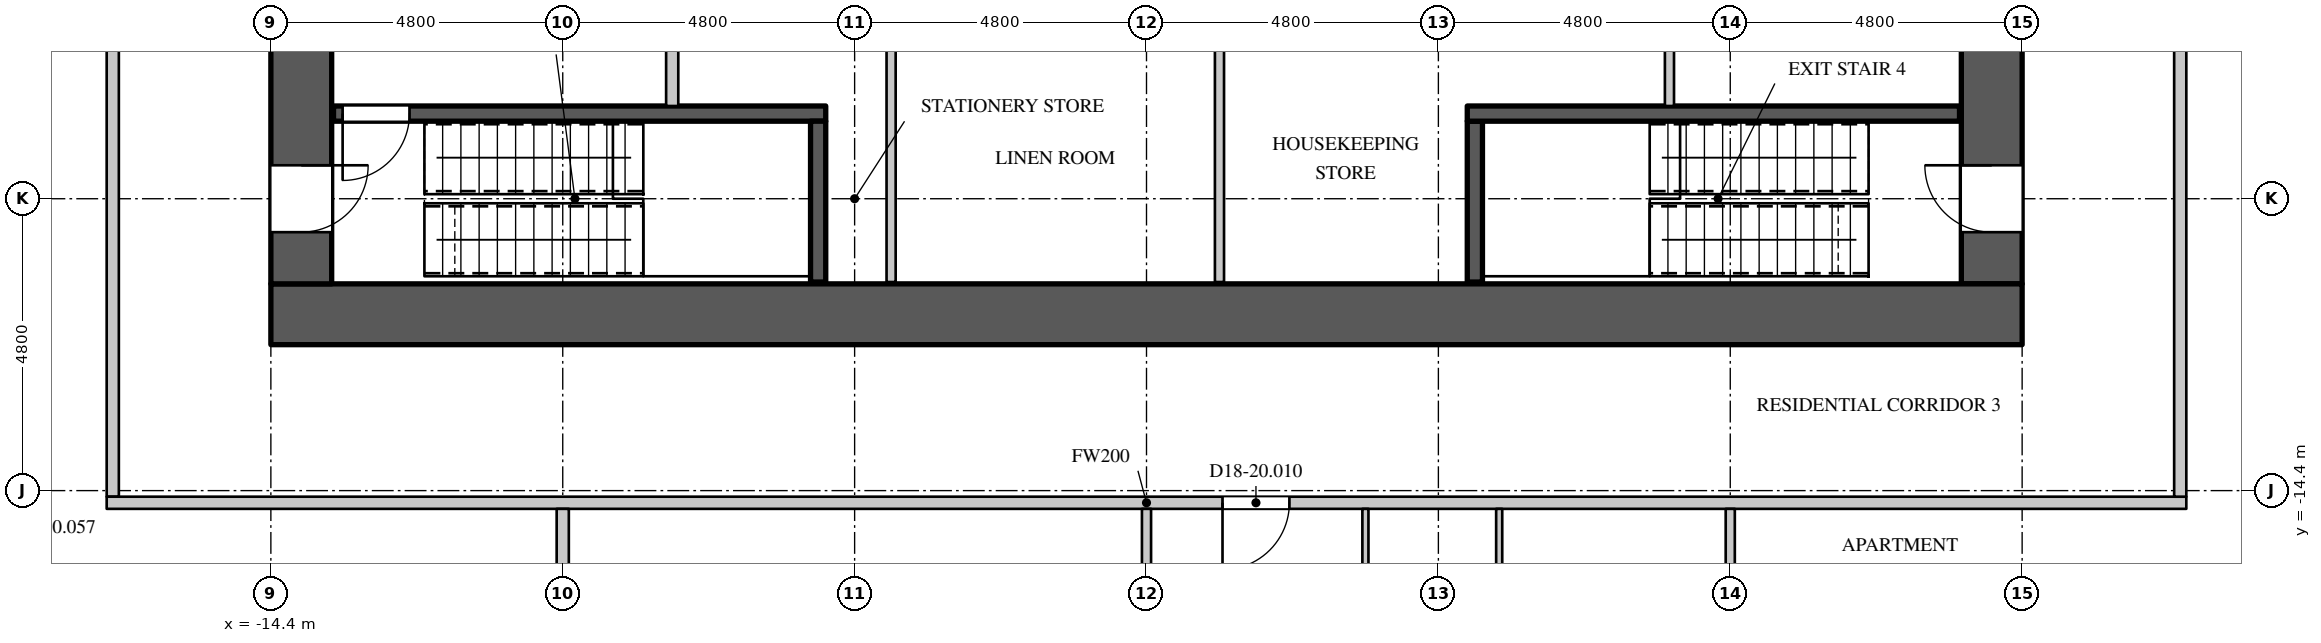
"""IFC4 building model, lengths in metres.
Left out: names, types, materials, properties, quantities, classifications, styles, units other than length and angle.
Written with IfcOpenShell. Run it as: python <this file> out.ifc"""

import sys

from ifc_helpers import new_model, si_unit, direction, frame, frame_2d, origin, place, context, subcontext, project, spatial, rectangle, extrude, element, fill, save


model = new_model("IFC4")
c1 = context("Model", 3, precision=1e-05, world=origin(), true_north=direction((0.0, 1.0)))
c2 = subcontext(c1, "Body", "Model", "MODEL_VIEW")
j1 = project(units=[si_unit("LENGTHUNIT", "METRE"), si_unit("PLANEANGLEUNIT", "RADIAN")], contexts=[c1])
p1 = place(None, origin())
s1 = spatial("IfcSite", under=j1, at=p1, CompositionType="ELEMENT")
p2 = place(p1, origin())
s2 = spatial("IfcBuilding", under=s1, at=p2, CompositionType="ELEMENT")
p3 = place(p2, frame((0.0, 0.0, 80.1)))
s3 = spatial("IfcBuildingStorey", under=s2, at=p3, CompositionType="ELEMENT", Elevation=80.1)
p4 = place(p3, frame((-14.4, -11.5, 0.0), z_axis=(0.0, 0.0, 1.0), x_axis=(1.0, 0.0, 0.0)))
e1 = element("IfcWall", 1, at=p4, inside=s3, PredefinedType="SHEAR", context=c2, shape_type="SweptSolid", body=[
    extrude(rectangle(XDim=28.8, YDim=1.0, at=frame_2d((14.4, 0.0))), origin(), (0.0, 0.0, 1.0), 4.2),
])
p5 = place(p3, frame((13.9, -11.0, 0.0), z_axis=(0.0, 0.0, 1.0), x_axis=(0.0, 1.0, 0.0)))
e2 = element("IfcWall", 2, at=p5, inside=s3, PredefinedType="SHEAR", context=c2, shape_type="SweptSolid", body=[
    extrude(rectangle(XDim=22.0, YDim=1.0, at=frame_2d((11.0, 0.0))), origin(), (0.0, 0.0, 1.0), 4.2),
])
p6 = place(p5, frame((20.05, 0.0, 0.0)))
e3 = element("IfcOpeningElement", 3, at=p6, cuts=e2, PredefinedType="OPENING", context=c2, shape_type="SweptSolid", body=[
    extrude(rectangle(XDim=1.1, YDim=2.2, at=frame_2d((0.55, 1.1))), frame((0.0, 0.51, 0.0), z_axis=(0.0, -1.0, 0.0), x_axis=(1.0, 0.0, 0.0)), (0.0, 0.0, 1.0), 1.02),
])
p7 = place(p5, frame((0.85, 0.0, 0.0)))
e4 = element("IfcOpeningElement", 4, at=p7, cuts=e2, PredefinedType="OPENING", context=c2, shape_type="SweptSolid", body=[
    extrude(rectangle(XDim=1.1, YDim=2.2, at=frame_2d((0.55, 1.1))), frame((0.0, 0.51, 0.0), z_axis=(0.0, -1.0, 0.0), x_axis=(1.0, 0.0, 0.0)), (0.0, 0.0, 1.0), 1.02),
])
p8 = place(p5, frame((14.55, 0.0, 0.0)))
e5 = element("IfcOpeningElement", 5, at=p8, cuts=e2, PredefinedType="OPENING", context=c2, shape_type="SweptSolid", body=[
    extrude(rectangle(XDim=1.5, YDim=2.4, at=frame_2d((0.75, 1.2))), frame((0.0, 0.51, 0.0), z_axis=(0.0, -1.0, 0.0), x_axis=(1.0, 0.0, 0.0)), (0.0, 0.0, 1.0), 1.02),
])
p9 = place(p5, frame((5.95, 0.0, 0.0)))
e6 = element("IfcOpeningElement", 6, at=p9, cuts=e2, PredefinedType="OPENING", context=c2, shape_type="SweptSolid", body=[
    extrude(rectangle(XDim=1.5, YDim=2.4, at=frame_2d((0.75, 1.2))), frame((0.0, 0.51, 0.0), z_axis=(0.0, -1.0, 0.0), x_axis=(1.0, 0.0, 0.0)), (0.0, 0.0, 1.0), 1.02),
])
p10 = place(p3, frame((-13.9, -11.0, 0.0), z_axis=(0.0, 0.0, 1.0), x_axis=(0.0, 1.0, 0.0)))
e7 = element("IfcWall", 7, at=p10, inside=s3, PredefinedType="SHEAR", context=c2, shape_type="SweptSolid", body=[
    extrude(rectangle(XDim=22.0, YDim=1.0, at=frame_2d((11.0, 0.0))), origin(), (0.0, 0.0, 1.0), 4.2),
])
p11 = place(p10, frame((20.05, 0.0, 0.0)))
e8 = element("IfcOpeningElement", 8, at=p11, cuts=e7, PredefinedType="OPENING", context=c2, shape_type="SweptSolid", body=[
    extrude(rectangle(XDim=1.1, YDim=2.2, at=frame_2d((0.55, 1.1))), frame((0.0, 0.51, 0.0), z_axis=(0.0, -1.0, 0.0), x_axis=(1.0, 0.0, 0.0)), (0.0, 0.0, 1.0), 1.02),
])
p12 = place(p10, frame((0.85, 0.0, 0.0)))
e9 = element("IfcOpeningElement", 9, at=p12, cuts=e7, PredefinedType="OPENING", context=c2, shape_type="SweptSolid", body=[
    extrude(rectangle(XDim=1.1, YDim=2.2, at=frame_2d((0.55, 1.1))), frame((0.0, 0.51, 0.0), z_axis=(0.0, -1.0, 0.0), x_axis=(1.0, 0.0, 0.0)), (0.0, 0.0, 1.0), 1.02),
])
p13 = place(p10, frame((15.75, 0.0, 0.0)))
e10 = element("IfcOpeningElement", 10, at=p13, cuts=e7, PredefinedType="OPENING", context=c2, shape_type="SweptSolid", body=[
    extrude(rectangle(XDim=1.5, YDim=2.4, at=frame_2d((0.75, 1.2))), frame((0.0, 0.51, 0.0), z_axis=(0.0, -1.0, 0.0), x_axis=(1.0, 0.0, 0.0)), (0.0, 0.0, 1.0), 1.02),
])
p14 = place(p10, frame((4.75, 0.0, 0.0)))
e11 = element("IfcOpeningElement", 11, at=p14, cuts=e7, PredefinedType="OPENING", context=c2, shape_type="SweptSolid", body=[
    extrude(rectangle(XDim=1.5, YDim=2.4, at=frame_2d((0.75, 1.2))), frame((0.0, 0.51, 0.0), z_axis=(0.0, -1.0, 0.0), x_axis=(1.0, 0.0, 0.0)), (0.0, 0.0, 1.0), 1.02),
])
p15 = place(p3, frame((-17.0, -14.5, 0.0), z_axis=(0.0, 0.0, 1.0), x_axis=(0.0, 1.0, 0.0)))
e12 = element("IfcWall", 12, at=p15, inside=s3, PredefinedType="PARTITIONING", context=c2, shape_type="SweptSolid", body=[
    extrude(rectangle(XDim=29.0, YDim=0.2, at=frame_2d((14.5, 0.0))), origin(), (0.0, 0.0, 1.0), 3.95),
])
p16 = place(p15, frame((16.5, 0.0, 0.0)))
e13 = element("IfcOpeningElement", 13, at=p16, cuts=e12, PredefinedType="OPENING", context=c2, shape_type="SweptSolid", body=[
    extrude(rectangle(XDim=1.1, YDim=2.4, at=frame_2d((0.55, 1.2))), frame((0.0, 0.11, 0.0), z_axis=(0.0, -1.0, 0.0), x_axis=(1.0, 0.0, 0.0)), (0.0, 0.0, 1.0), 0.22),
])
p17 = place(p3, frame((-17.1, -14.6, 0.0), z_axis=(0.0, 0.0, 1.0), x_axis=(1.0, 0.0, 0.0)))
e14 = element("IfcWall", 14, at=p17, inside=s3, PredefinedType="PARTITIONING", context=c2, shape_type="SweptSolid", body=[
    extrude(rectangle(XDim=34.2, YDim=0.2, at=frame_2d((17.1, 0.0))), origin(), (0.0, 0.0, 1.0), 3.95),
])
p18 = place(p17, frame((18.35, 0.0, 0.0)))
e15 = element("IfcOpeningElement", 15, at=p18, cuts=e14, PredefinedType="OPENING", context=c2, shape_type="SweptSolid", body=[
    extrude(rectangle(XDim=1.1, YDim=2.4, at=frame_2d((0.55, 1.2))), frame((0.0, 0.11, 0.0), z_axis=(0.0, -1.0, 0.0), x_axis=(1.0, 0.0, 0.0)), (0.0, 0.0, 1.0), 0.22),
])
p19 = place(p3, frame((-7.8, -8.075, 0.0), z_axis=(0.0, 0.0, 1.0), x_axis=(0.0, 1.0, 0.0)))
e16 = element("IfcWall", 16, at=p19, inside=s3, PredefinedType="PARTITIONING", context=c2, shape_type="SweptSolid", body=[
    extrude(rectangle(XDim=5.275, YDim=0.2, at=frame_2d((2.637, 0.0))), origin(), (0.0, 0.0, 1.0), 3.95),
])
p20 = place(p19, frame((3.0, 0.0, 0.0)))
e17 = element("IfcOpeningElement", 17, at=p20, cuts=e16, PredefinedType="OPENING", context=c2, shape_type="SweptSolid", body=[
    extrude(rectangle(XDim=1.5, YDim=2.4, at=frame_2d((0.75, 1.2))), frame((0.0, 0.11, 0.0), z_axis=(0.0, -1.0, 0.0), x_axis=(1.0, 0.0, 0.0)), (0.0, 0.0, 1.0), 0.22),
])
p21 = place(p3, frame((17.0, -14.5, 0.0), z_axis=(0.0, 0.0, 1.0), x_axis=(0.0, 1.0, 0.0)))
e18 = element("IfcWall", 18, at=p21, inside=s3, PredefinedType="PARTITIONING", context=c2, shape_type="SweptSolid", body=[
    extrude(rectangle(XDim=29.0, YDim=0.2, at=frame_2d((14.5, 0.0))), origin(), (0.0, 0.0, 1.0), 3.95),
])
p22 = place(p3, frame((-22.547, -11.885, 0.0), z_axis=(0.0, 0.0, 1.0), x_axis=(0.707106781187, -0.707106781187, 0.0)))
e19 = element("IfcWall", 19, at=p22, inside=s3, PredefinedType="PARTITIONING", context=c2, shape_type="SweptSolid", body=[
    extrude(rectangle(XDim=15.078, YDim=0.15, at=frame_2d((7.539, 0.0))), origin(), (0.0, 0.0, 1.0), 3.95),
])
p23 = place(p22, frame((3.95, 0.0, 0.0)))
e20 = element("IfcOpeningElement", 20, at=p23, cuts=e19, PredefinedType="OPENING", context=c2, shape_type="SweptSolid", body=[
    extrude(rectangle(XDim=0.95, YDim=2.2, at=frame_2d((0.475, 1.1))), frame((0.0, 0.085, 0.0), z_axis=(0.0, -1.0, 0.0), x_axis=(1.0, 0.0, 0.0)), (0.0, 0.0, 1.0), 0.17),
])
p24 = place(p22, frame((9.55, 0.0, 0.0)))
e21 = element("IfcOpeningElement", 21, at=p24, cuts=e19, PredefinedType="OPENING", context=c2, shape_type="SweptSolid", body=[
    extrude(rectangle(XDim=0.95, YDim=2.2, at=frame_2d((0.475, 1.1))), frame((0.0, 0.085, 0.0), z_axis=(0.0, -1.0, 0.0), x_axis=(1.0, 0.0, 0.0)), (0.0, 0.0, 1.0), 0.17),
])
p25 = place(p22, frame((13.95, 0.0, 0.0)))
e22 = element("IfcOpeningElement", 22, at=p25, cuts=e19, PredefinedType="OPENING", context=c2, shape_type="SweptSolid", body=[
    extrude(rectangle(XDim=0.95, YDim=2.2, at=frame_2d((0.475, 1.1))), frame((0.0, 0.085, 0.0), z_axis=(0.0, -1.0, 0.0), x_axis=(1.0, 0.0, 0.0)), (0.0, 0.0, 1.0), 0.17),
])
p26 = place(p3, frame((-4.2, -10.97, 0.0), z_axis=(0.0, 0.0, 1.0), x_axis=(0.0, 1.0, 0.0)))
e23 = element("IfcWall", 23, at=p26, inside=s3, PredefinedType="PARTITIONING", context=c2, shape_type="SweptSolid", body=[
    extrude(rectangle(XDim=5.07, YDim=0.15, at=frame_2d((2.535, 0.0))), origin(), (0.0, 0.0, 1.0), 3.95),
])
p27 = place(p3, frame((0.0, -28.855, 0.0), z_axis=(0.0, 0.0, 1.0), x_axis=(0.0, 1.0, 0.0)))
e24 = element("IfcWall", 24, at=p27, inside=s3, PredefinedType="PARTITIONING", context=c2, shape_type="SweptSolid", body=[
    extrude(rectangle(XDim=14.155, YDim=0.15, at=frame_2d((7.078, 0.0))), origin(), (0.0, 0.0, 1.0), 3.95),
])
p28 = place(p27, frame((10.2, 0.0, 0.0)))
e25 = element("IfcOpeningElement", 25, at=p28, cuts=e24, PredefinedType="OPENING", context=c2, shape_type="SweptSolid", body=[
    extrude(rectangle(XDim=0.95, YDim=2.2, at=frame_2d((0.475, 1.1))), frame((0.0, 0.085, 0.0), z_axis=(0.0, -1.0, 0.0), x_axis=(1.0, 0.0, 0.0)), (0.0, 0.0, 1.0), 0.17),
])
p29 = place(p3, frame((1.2, -10.97, 0.0), z_axis=(0.0, 0.0, 1.0), x_axis=(0.0, 1.0, 0.0)))
e26 = element("IfcWall", 26, at=p29, inside=s3, PredefinedType="PARTITIONING", context=c2, shape_type="SweptSolid", body=[
    extrude(rectangle(XDim=5.07, YDim=0.15, at=frame_2d((2.535, 0.0))), origin(), (0.0, 0.0, 1.0), 3.95),
])
p30 = place(p3, frame((8.6, -8.075, 0.0), z_axis=(0.0, 0.0, 1.0), x_axis=(0.0, 1.0, 0.0)))
e27 = element("IfcWall", 27, at=p30, inside=s3, PredefinedType="PARTITIONING", context=c2, shape_type="SweptSolid", body=[
    extrude(rectangle(XDim=2.175, YDim=0.15, at=frame_2d((1.087, 0.0))), origin(), (0.0, 0.0, 1.0), 3.95),
])
p31 = place(p3, frame((9.6, -28.855, 0.0), z_axis=(0.0, 0.0, 1.0), x_axis=(0.0, 1.0, 0.0)))
e28 = element("IfcWall", 28, at=p31, inside=s3, PredefinedType="PARTITIONING", context=c2, shape_type="SweptSolid", body=[
    extrude(rectangle(XDim=14.155, YDim=0.15, at=frame_2d((7.078, 0.0))), origin(), (0.0, 0.0, 1.0), 3.95),
])
p32 = place(p31, frame((2.1, 0.0, 0.0)))
e29 = element("IfcOpeningElement", 29, at=p32, cuts=e28, PredefinedType="OPENING", context=c2, shape_type="SweptSolid", body=[
    extrude(rectangle(XDim=1.5, YDim=2.2, at=frame_2d((0.75, 1.1))), frame((0.0, 0.085, 0.0), z_axis=(0.0, -1.0, 0.0), x_axis=(1.0, 0.0, 0.0)), (0.0, 0.0, 1.0), 0.17),
])
p33 = place(p31, frame((10.2, 0.0, 0.0)))
e30 = element("IfcOpeningElement", 30, at=p33, cuts=e28, PredefinedType="OPENING", context=c2, shape_type="SweptSolid", body=[
    extrude(rectangle(XDim=0.95, YDim=2.2, at=frame_2d((0.475, 1.1))), frame((0.0, 0.085, 0.0), z_axis=(0.0, -1.0, 0.0), x_axis=(1.0, 0.0, 0.0)), (0.0, 0.0, 1.0), 0.17),
])
p34 = place(p3, frame((16.02, -19.26, 0.0), z_axis=(0.0, 0.0, 1.0), x_axis=(0.707106781187, 0.707106781187, 0.0)))
e31 = element("IfcWall", 31, at=p34, inside=s3, PredefinedType="PARTITIONING", context=c2, shape_type="SweptSolid", body=[
    extrude(rectangle(XDim=10.229, YDim=0.15, at=frame_2d((5.114, 0.0))), origin(), (0.0, 0.0, 1.0), 3.95),
])
p35 = place(p34, frame((4.3, 0.0, 0.0)))
e32 = element("IfcOpeningElement", 32, at=p35, cuts=e31, PredefinedType="OPENING", context=c2, shape_type="SweptSolid", body=[
    extrude(rectangle(XDim=0.95, YDim=2.2, at=frame_2d((0.475, 1.1))), frame((0.0, 0.085, 0.0), z_axis=(0.0, -1.0, 0.0), x_axis=(1.0, 0.0, 0.0)), (0.0, 0.0, 1.0), 0.17),
])
p36 = place(p34, frame((0.6, 0.0, 0.0)))
e33 = element("IfcOpeningElement", 33, at=p36, cuts=e31, PredefinedType="OPENING", context=c2, shape_type="SweptSolid", body=[
    extrude(rectangle(XDim=0.95, YDim=2.2, at=frame_2d((0.475, 1.1))), frame((0.0, 0.085, 0.0), z_axis=(0.0, -1.0, 0.0), x_axis=(1.0, 0.0, 0.0)), (0.0, 0.0, 1.0), 0.17),
])
p37 = place(p34, frame((9.1, 0.0, 0.0)))
e34 = element("IfcOpeningElement", 34, at=p37, cuts=e31, PredefinedType="OPENING", context=c2, shape_type="SweptSolid", body=[
    extrude(rectangle(XDim=0.95, YDim=2.2, at=frame_2d((0.475, 1.1))), frame((0.0, 0.085, 0.0), z_axis=(0.0, -1.0, 0.0), x_axis=(1.0, 0.0, 0.0)), (0.0, 0.0, 1.0), 0.17),
])
p38 = place(p3, frame((-9.6, -28.855, 0.0), z_axis=(0.0, 0.0, 1.0), x_axis=(0.0, 1.0, 0.0)))
e35 = element("IfcWall", 35, at=p38, inside=s3, PredefinedType="PARTITIONING", context=c2, shape_type="SweptSolid", body=[
    extrude(rectangle(XDim=14.155, YDim=0.2, at=frame_2d((7.078, 0.0))), origin(), (0.0, 0.0, 1.0), 3.95),
])
p39 = place(p3, frame((-13.37, -8.2, 0.0), z_axis=(0.0, 0.0, 1.0), x_axis=(1.0, 0.0, 0.0)))
e36 = element("IfcWall", 36, at=p39, inside=s3, PredefinedType="SHEAR", context=c2, shape_type="SweptSolid", body=[
    extrude(rectangle(XDim=8.095, YDim=0.25, at=frame_2d((4.048, 0.0))), origin(), (0.0, 0.0, 1.0), 3.95),
])
p40 = place(p39, frame((0.15, 0.0, 0.0)))
e37 = element("IfcOpeningElement", 37, at=p40, cuts=e36, PredefinedType="OPENING", context=c2, shape_type="SweptSolid", body=[
    extrude(rectangle(XDim=1.1, YDim=2.2, at=frame_2d((0.55, 1.1))), frame((0.0, 0.135, 0.0), z_axis=(0.0, -1.0, 0.0), x_axis=(1.0, 0.0, 0.0)), (0.0, 0.0, 1.0), 0.27),
])
for number, where, z_axis, x_axis in (
    (38, (-5.4, -10.97, 0.0), (0.0, 0.0, 1.0), (0.0, 1.0, 0.0)),
    (39, (5.4, -10.97, 0.0), (0.0, 0.0, 1.0), (0.0, 1.0, 0.0)),
):
    element("IfcWall", number, at=place(p3, frame(where, z_axis=z_axis, x_axis=x_axis)), inside=s3, PredefinedType="SHEAR", context=c2, shape_type="SweptSolid", body=[
        extrude(rectangle(XDim=2.645, YDim=0.25, at=frame_2d((1.323, 0.0))), origin(), (0.0, 0.0, 1.0), 3.95),
    ])
p41 = place(p3, frame((5.275, -8.2, 0.0), z_axis=(0.0, 0.0, 1.0), x_axis=(1.0, 0.0, 0.0)))
e40 = element("IfcWall", 40, at=p41, inside=s3, PredefinedType="SHEAR", context=c2, shape_type="SweptSolid", body=[
    extrude(rectangle(XDim=8.095, YDim=0.25, at=frame_2d((4.048, 0.0))), origin(), (0.0, 0.0, 1.0), 3.95),
])
p42 = place(p3, frame((3.6, -21.725, 0.0), z_axis=(0.0, 0.0, 1.0), x_axis=(0.0, 1.0, 0.0)))
e41 = element("IfcWall", 41, at=p42, inside=s3, PredefinedType="PARTITIONING", context=c2, shape_type="SweptSolid", body=[
    extrude(rectangle(XDim=7.025, YDim=0.1, at=frame_2d((3.513, 0.0))), origin(), (0.0, 0.0, 1.0), 3.95),
])
p43 = place(p42, frame((3.05, 0.0, 0.0)))
e42 = element("IfcOpeningElement", 42, at=p43, cuts=e41, PredefinedType="OPENING", context=c2, shape_type="SweptSolid", body=[
    extrude(rectangle(XDim=0.9, YDim=2.2, at=frame_2d((0.45, 1.1))), frame((0.0, 0.06, 0.0), z_axis=(0.0, -1.0, 0.0), x_axis=(1.0, 0.0, 0.0)), (0.0, 0.0, 1.0), 0.12),
])
p44 = place(p3, frame((5.8, -21.725, 0.0), z_axis=(0.0, 0.0, 1.0), x_axis=(0.0, 1.0, 0.0)))
e43 = element("IfcWall", 43, at=p44, inside=s3, PredefinedType="PARTITIONING", context=c2, shape_type="SweptSolid", body=[
    extrude(rectangle(XDim=7.025, YDim=0.1, at=frame_2d((3.513, 0.0))), origin(), (0.0, 0.0, 1.0), 3.95),
])
p45 = place(p40, origin())
e44 = element("IfcDoor", 44, at=p45, inside=s3, OperationType="SINGLE_SWING_RIGHT", PredefinedType="DOOR", context=c2, shape_type="SweptSolid", body=[
    extrude(rectangle(XDim=1.1, YDim=2.2, at=frame_2d((0.55, 1.1))), frame((0.0, 0.025, 0.0), z_axis=(0.0, -1.0, 0.0), x_axis=(1.0, 0.0, 0.0)), (0.0, 0.0, 1.0), 0.05),
])
fill(e37, e44)
p46 = place(p12, origin())
e45 = element("IfcDoor", 45, at=p46, inside=s3, OperationType="SINGLE_SWING_LEFT", PredefinedType="DOOR", context=c2, shape_type="SweptSolid", body=[
    extrude(rectangle(XDim=1.1, YDim=2.2, at=frame_2d((0.55, 1.1))), frame((0.0, -0.445, 0.0), z_axis=(0.0, -1.0, 0.0), x_axis=(1.0, 0.0, 0.0)), (0.0, 0.0, 1.0), 0.05),
])
fill(e9, e45)
p47 = place(p7, origin())
e46 = element("IfcDoor", 46, at=p47, inside=s3, OperationType="SINGLE_SWING_RIGHT", PredefinedType="DOOR", context=c2, shape_type="SweptSolid", body=[
    extrude(rectangle(XDim=1.1, YDim=2.2, at=frame_2d((0.55, 1.1))), frame((0.0, 0.495, 0.0), z_axis=(0.0, -1.0, 0.0), x_axis=(1.0, 0.0, 0.0)), (0.0, 0.0, 1.0), 0.05),
])
fill(e4, e46)
p48 = place(p18, origin())
e47 = element("IfcDoor", 47, at=p48, inside=s3, OperationType="SINGLE_SWING_RIGHT", PredefinedType="DOOR", context=c2, shape_type="SweptSolid", body=[
    extrude(rectangle(XDim=1.1, YDim=2.4, at=frame_2d((0.55, 1.2))), frame((0.0, 0.025, 0.0), z_axis=(0.0, -1.0, 0.0), x_axis=(1.0, 0.0, 0.0)), (0.0, 0.0, 1.0), 0.05),
])
fill(e15, e47)
save(model, sys.argv[1])
